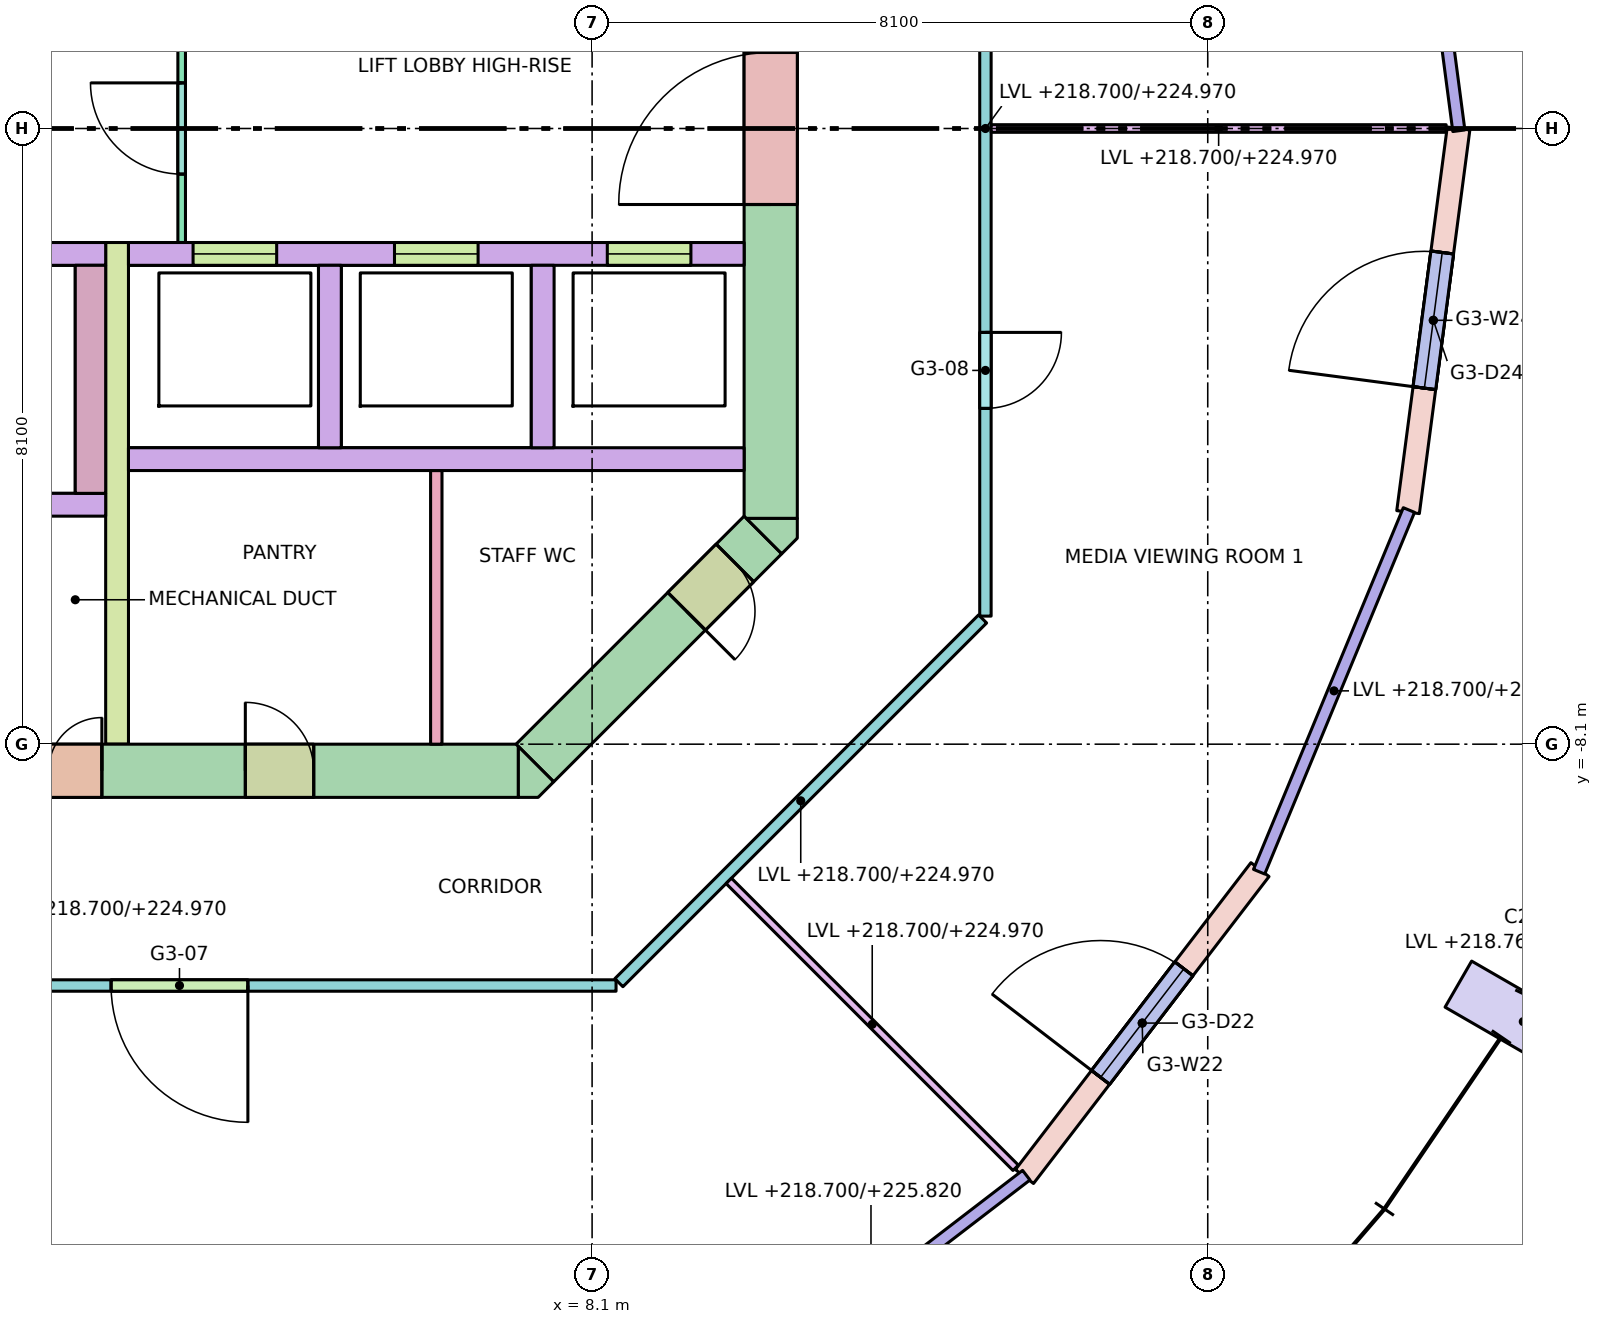
"""IFC4 building model, lengths in metres.
Left out: names, types, materials, properties, quantities, classifications, styles, units other than length and angle.
Written with IfcOpenShell. Run it as: python <this file> out.ifc"""

import sys

from ifc_helpers import new_model, si_unit, direction, frame, frame_2d, origin, origin_2d, place, context, subcontext, project, spatial, polyline, rectangle, outline, extrude, element, fill, save


model = new_model("IFC4")
c1 = context("Model", 3, precision=1e-05, world=origin(), true_north=direction((0.0, 1.0)))
c2 = subcontext(c1, "Body", "Model", "MODEL_VIEW")
j1 = project(units=[si_unit("LENGTHUNIT", "METRE"), si_unit("PLANEANGLEUNIT", "RADIAN")], contexts=[c1])
p1 = place(None, origin())
s1 = spatial("IfcSite", under=j1, at=p1, CompositionType="ELEMENT")
p2 = place(p1, origin())
s2 = spatial("IfcBuilding", under=s1, at=p2, CompositionType="ELEMENT")
p3 = place(p2, frame((0.0, 0.0, 218.7)))
s3 = spatial("IfcBuildingStorey", under=s2, at=p3, CompositionType="ELEMENT", Elevation=218.7)
p4 = place(p3, frame((19.927, -11.505, 0.067), z_axis=(0.115974555477, -0.066927607381, 0.990994751677), x_axis=(0.499830087764, 0.866123480438, 0.0)))
e1 = element("IfcColumn", 1, at=p4, inside=s3, PredefinedType="COLUMN", context=c2, shape_type="SweptSolid", body=[
    extrude(rectangle(XDim=0.7, YDim=1.0, at=origin_2d()), origin(), (0.0, 0.0, 1.0), 7.332),
])
p5 = place(p3, frame((-7.13, -8.45, -0.28), z_axis=(0.0, 0.0, 1.0), x_axis=(1.0, 0.0, 0.0)))
e2 = element("IfcWall", 2, at=p5, inside=s3, PredefinedType="SHEAR", context=c2, shape_type="SweptSolid", body=[
    extrude(rectangle(XDim=14.26, YDim=0.7, at=frame_2d((7.13, 0.0))), origin(), (0.0, 0.0, 1.0), 7.4),
])
p6 = place(p5, frame((8.08, 0.0, 0.28)))
e3 = element("IfcOpeningElement", 3, at=p6, cuts=e2, PredefinedType="OPENING", context=c2, shape_type="SweptSolid", body=[
    extrude(rectangle(XDim=0.7, YDim=2.1, at=frame_2d((0.35, 1.05))), frame((0.0, 0.36, 0.0), z_axis=(0.0, -1.0, 0.0), x_axis=(1.0, 0.0, 0.0)), (0.0, 0.0, 1.0), 0.72),
])
p7 = place(p5, frame((6.205, 0.0, 0.28)))
e4 = element("IfcOpeningElement", 4, at=p7, cuts=e2, PredefinedType="OPENING", context=c2, shape_type="SweptSolid", body=[
    extrude(rectangle(XDim=0.9, YDim=2.1, at=frame_2d((0.45, 1.05))), frame((0.0, 0.36, 0.0), z_axis=(0.0, -1.0, 0.0), x_axis=(1.0, 0.0, 0.0)), (0.0, 0.0, 1.0), 0.72),
])
p8 = place(p5, frame((10.667, 0.0, 0.28)))
e5 = element("IfcOpeningElement", 5, at=p8, cuts=e2, PredefinedType="OPENING", context=c2, shape_type="SweptSolid", body=[
    extrude(rectangle(XDim=0.9, YDim=2.1, at=frame_2d((0.45, 1.05))), frame((0.0, 0.36, 0.0), z_axis=(0.0, -1.0, 0.0), x_axis=(1.0, 0.0, 0.0)), (0.0, 0.0, 1.0), 0.72),
])
p9 = place(p3, frame((10.45, -5.13, -0.28), z_axis=(0.0, 0.0, 1.0), x_axis=(0.0, 1.0, 0.0)))
e6 = element("IfcWall", 6, at=p9, inside=s3, PredefinedType="SHEAR", context=c2, shape_type="SweptSolid", body=[
    extrude(rectangle(XDim=10.26, YDim=0.7, at=frame_2d((5.13, 0.0))), origin(), (0.0, 0.0, 1.0), 7.4),
])
p10 = place(p9, frame((4.13, 0.0, 0.28)))
e7 = element("IfcOpeningElement", 7, at=p10, cuts=e6, PredefinedType="OPENING", context=c2, shape_type="SweptSolid", body=[
    extrude(rectangle(XDim=2.0, YDim=2.1, at=frame_2d((1.0, 1.05))), frame((0.0, 0.36, 0.0), z_axis=(0.0, -1.0, 0.0), x_axis=(1.0, 0.0, 0.0)), (0.0, 0.0, 1.0), 0.72),
])
p11 = place(p3, frame((10.347, -5.347, -0.28), z_axis=(0.0, 0.0, 1.0), x_axis=(-0.707106781187, -0.707106781187, 0.0)))
e8 = element("IfcWall", 8, at=p11, inside=s3, PredefinedType="SHEAR", context=c2, shape_type="SweptSolid", body=[
    extrude(rectangle(XDim=4.243, YDim=0.7, at=frame_2d((2.121, 0.0))), origin(), (0.0, 0.0, 1.0), 7.4),
])
p12 = place(p11, frame((0.52, 0.0, 0.28)))
e9 = element("IfcOpeningElement", 9, at=p12, cuts=e8, PredefinedType="OPENING", context=c2, shape_type="SweptSolid", body=[
    extrude(rectangle(XDim=0.9, YDim=2.1, at=frame_2d((0.45, 1.05))), frame((0.0, 0.36, 0.0), z_axis=(0.0, -1.0, 0.0), x_axis=(1.0, 0.0, 0.0)), (0.0, 0.0, 1.0), 0.72),
])
p13 = place(p3, frame((0.0, 0.0, -0.28)))
e10 = element("IfcWall", 10, at=p13, inside=s3, PredefinedType="SHEAR", context=c2, shape_type="SweptSolid", body=[
    extrude(outline(polyline([(7.39, -8.8), (7.13, -8.8), (7.13, -8.8), (7.13, -8.13), (7.595, -8.595), (7.595, -8.595), (7.595, -8.595), (7.39, -8.8)])), origin(), (0.0, 0.0, 1.0), 7.4),
])
p14 = place(p3, frame((0.0, 0.0, -0.28)))
e11 = element("IfcWall", 11, at=p14, inside=s3, PredefinedType="SHEAR", context=c2, shape_type="SweptSolid", body=[
    extrude(outline(polyline([(10.8, -5.39), (10.595, -5.595), (10.595, -5.595), (10.595, -5.595), (10.13, -5.13), (10.8, -5.13), (10.8, -5.13), (10.8, -5.39)])), origin(), (0.0, 0.0, 1.0), 7.4),
])
p15 = place(p3, frame((2.0, -4.35, 0.0), z_axis=(0.0, 0.0, 1.0), x_axis=(1.0, 0.0, 0.0)))
e12 = element("IfcWall", 12, at=p15, inside=s3, PredefinedType="SOLIDWALL", context=c2, shape_type="SweptSolid", body=[
    extrude(rectangle(XDim=8.1, YDim=0.3, at=frame_2d((4.05, 0.0))), origin(), (0.0, 0.0, 1.0), 7.12),
])
p16 = place(p3, frame((2.0, -1.65, 0.0), z_axis=(0.0, 0.0, 1.0), x_axis=(1.0, 0.0, 0.0)))
e13 = element("IfcWall", 13, at=p16, inside=s3, PredefinedType="SOLIDWALL", context=c2, shape_type="SweptSolid", body=[
    extrude(rectangle(XDim=8.1, YDim=0.3, at=frame_2d((4.05, 0.0))), origin(), (0.0, 0.0, 1.0), 7.12),
])
p17 = place(p16, frame((0.85, 0.0, 0.0)))
e14 = element("IfcOpeningElement", 14, at=p17, cuts=e13, PredefinedType="OPENING", context=c2, shape_type="SweptSolid", body=[
    extrude(rectangle(XDim=1.1, YDim=2.1, at=frame_2d((0.55, 1.05))), frame((0.0, 0.16, 0.0), z_axis=(0.0, -1.0, 0.0), x_axis=(1.0, 0.0, 0.0)), (0.0, 0.0, 1.0), 0.32),
])
p18 = place(p16, frame((3.5, 0.0, 0.0)))
e15 = element("IfcOpeningElement", 15, at=p18, cuts=e13, PredefinedType="OPENING", context=c2, shape_type="SweptSolid", body=[
    extrude(rectangle(XDim=1.1, YDim=2.1, at=frame_2d((0.55, 1.05))), frame((0.0, 0.16, 0.0), z_axis=(0.0, -1.0, 0.0), x_axis=(1.0, 0.0, 0.0)), (0.0, 0.0, 1.0), 0.32),
])
p19 = place(p16, frame((6.3, 0.0, 0.0)))
e16 = element("IfcOpeningElement", 16, at=p19, cuts=e13, PredefinedType="OPENING", context=c2, shape_type="SweptSolid", body=[
    extrude(rectangle(XDim=1.1, YDim=2.1, at=frame_2d((0.55, 1.05))), frame((0.0, 0.16, 0.0), z_axis=(0.0, -1.0, 0.0), x_axis=(1.0, 0.0, 0.0)), (0.0, 0.0, 1.0), 0.32),
])
for number, where, z_axis, x_axis in (
    (17, (4.65, -4.2, 0.0), (0.0, 0.0, 1.0), (0.0, 1.0, 0.0)),
    (18, (7.45, -4.2, 0.0), (0.0, 0.0, 1.0), (0.0, 1.0, 0.0)),
):
    element("IfcWall", number, at=place(p3, frame(where, z_axis=z_axis, x_axis=x_axis)), inside=s3, PredefinedType="SOLIDWALL", context=c2, shape_type="SweptSolid", body=[
        extrude(rectangle(XDim=2.4, YDim=0.3, at=frame_2d((1.2, 0.0))), origin(), (0.0, 0.0, 1.0), 7.12),
    ])
p20 = place(p3, frame((1.85, -8.1, 0.0), z_axis=(0.0, 0.0, 1.0), x_axis=(0.0, 1.0, 0.0)))
e19 = element("IfcWall", 19, at=p20, inside=s3, PredefinedType="SHEAR", context=c2, shape_type="SweptSolid", body=[
    extrude(rectangle(XDim=6.6, YDim=0.3, at=frame_2d((3.3, 0.0))), origin(), (0.0, 0.0, 1.0), 7.12),
])
p21 = place(p3, frame((-1.7, -1.65, 0.0), z_axis=(0.0, 0.0, 1.0), x_axis=(1.0, 0.0, 0.0)))
e20 = element("IfcWall", 20, at=p21, inside=s3, PredefinedType="SOLIDWALL", context=c2, shape_type="SweptSolid", body=[
    extrude(rectangle(XDim=3.4, YDim=0.3, at=frame_2d((1.7, 0.0))), origin(), (0.0, 0.0, 1.0), 7.12),
])
p22 = place(p21, frame((1.15, 0.0, 0.0)))
e21 = element("IfcOpeningElement", 21, at=p22, cuts=e20, PredefinedType="OPENING", context=c2, shape_type="SweptSolid", body=[
    extrude(rectangle(XDim=1.1, YDim=2.1, at=frame_2d((0.55, 1.05))), frame((0.0, 0.16, 0.0), z_axis=(0.0, -1.0, 0.0), x_axis=(1.0, 0.0, 0.0)), (0.0, 0.0, 1.0), 0.32),
])
p23 = place(p3, frame((1.5, -4.8, 0.0), z_axis=(0.0, 0.0, 1.0), x_axis=(0.0, 1.0, 0.0)))
e22 = element("IfcWall", 22, at=p23, inside=s3, PredefinedType="SOLIDWALL", context=c2, shape_type="SweptSolid", body=[
    extrude(rectangle(XDim=3.0, YDim=0.4, at=frame_2d((1.5, 0.0))), origin(), (0.0, 0.0, 1.0), 7.12),
])
p24 = place(p3, frame((-1.7, -4.95, 0.0), z_axis=(0.0, 0.0, 1.0), x_axis=(1.0, 0.0, 0.0)))
e23 = element("IfcWall", 23, at=p24, inside=s3, PredefinedType="SOLIDWALL", context=c2, shape_type="SweptSolid", body=[
    extrude(rectangle(XDim=3.4, YDim=0.3, at=frame_2d((1.7, 0.0))), origin(), (0.0, 0.0, 1.0), 7.12),
])
p25 = place(p3, frame((13.789, -13.789, 0.0), z_axis=(0.0, 0.0, 1.0), x_axis=(0.608757714995, 0.79335619014, 0.0)))
e24 = element("IfcWall", 24, at=p25, inside=s3, PredefinedType="STANDARD", context=c2, shape_type="SweptSolid", body=[
    extrude(rectangle(XDim=5.091, YDim=0.3, at=frame_2d((2.545, 0.0))), origin(), (0.0, 0.0, 1.0), 7.12),
])
p26 = place(p25, frame((1.645, 0.0, 0.0)))
e25 = element("IfcOpeningElement", 25, at=p26, cuts=e24, PredefinedType="OPENING", context=c2, shape_type="SweptSolid", body=[
    extrude(rectangle(XDim=1.8, YDim=2.4, at=frame_2d((0.9, 1.2))), frame((0.0, 0.16, 0.0), z_axis=(0.0, -1.0, 0.0), x_axis=(1.0, 0.0, 0.0)), (0.0, 0.0, 1.0), 0.32),
])
p27 = place(p25, frame((1.645, 0.0, 2.8)))
e26 = element("IfcOpeningElement", 26, at=p27, cuts=e24, PredefinedType="OPENING", context=c2, shape_type="SweptSolid", body=[
    extrude(rectangle(XDim=1.8, YDim=4.1, at=frame_2d((0.9, 2.05))), frame((0.0, 0.16, 0.0), z_axis=(0.0, -1.0, 0.0), x_axis=(1.0, 0.0, 0.0)), (0.0, 0.0, 1.0), 0.32),
])
p28 = place(p3, frame((18.836, -5.047, 0.0), z_axis=(0.0, 0.0, 1.0), x_axis=(0.130495451964, 0.99144890792, 0.0)))
e27 = element("IfcWall", 27, at=p28, inside=s3, PredefinedType="STANDARD", context=c2, shape_type="SweptSolid", body=[
    extrude(rectangle(XDim=5.091, YDim=0.3, at=frame_2d((2.545, 0.0))), origin(), (0.0, 0.0, 1.0), 7.12),
])
p29 = place(p28, frame((1.645, 0.0, 0.0)))
e28 = element("IfcOpeningElement", 28, at=p29, cuts=e27, PredefinedType="OPENING", context=c2, shape_type="SweptSolid", body=[
    extrude(rectangle(XDim=1.8, YDim=2.4, at=frame_2d((0.9, 1.2))), frame((0.0, 0.16, 0.0), z_axis=(0.0, -1.0, 0.0), x_axis=(1.0, 0.0, 0.0)), (0.0, 0.0, 1.0), 0.32),
])
p30 = place(p28, frame((1.645, 0.0, 2.8)))
e29 = element("IfcOpeningElement", 29, at=p30, cuts=e27, PredefinedType="OPENING", context=c2, shape_type="SweptSolid", body=[
    extrude(rectangle(XDim=1.8, YDim=4.1, at=frame_2d((0.9, 2.05))), frame((0.0, 0.16, 0.0), z_axis=(0.0, -1.0, 0.0), x_axis=(1.0, 0.0, 0.0)), (0.0, 0.0, 1.0), 0.32),
])
p31 = place(p3, frame((2.7, -1.5, 0.0), z_axis=(0.0, 0.0, 1.0), x_axis=(0.0, 1.0, 0.0)))
e30 = element("IfcWall", 30, at=p31, inside=s3, PredefinedType="PARTITIONING", context=c2, shape_type="SweptSolid", body=[
    extrude(rectangle(XDim=3.0, YDim=0.1, at=frame_2d((1.5, 0.0))), origin(), (0.0, 0.0, 1.0), 7.12),
])
p32 = place(p31, frame((0.9, 0.0, 0.0)))
e31 = element("IfcOpeningElement", 31, at=p32, cuts=e30, PredefinedType="OPENING", context=c2, shape_type="SweptSolid", body=[
    extrude(rectangle(XDim=1.2, YDim=2.1, at=frame_2d((0.6, 1.05))), frame((0.0, 0.06, 0.0), z_axis=(0.0, -1.0, 0.0), x_axis=(1.0, 0.0, 0.0)), (0.0, 0.0, 1.0), 0.12),
])
p33 = place(p3, frame((6.05, -8.1, 0.0), z_axis=(0.0, 0.0, 1.0), x_axis=(0.0, 1.0, 0.0)))
e32 = element("IfcWall", 32, at=p33, inside=s3, PredefinedType="PARTITIONING", context=c2, shape_type="SweptSolid", body=[
    extrude(rectangle(XDim=3.6, YDim=0.15, at=frame_2d((1.8, 0.0))), origin(), (0.0, 0.0, 1.0), 7.12),
])
p34 = place(p3, frame((13.238, -6.452, 0.0), z_axis=(0.0, 0.0, 1.0), x_axis=(-0.707106781187, -0.707106781187, 0.0)))
e33 = element("IfcWall", 33, at=p34, inside=s3, PredefinedType="PARTITIONING", context=c2, shape_type="SweptSolid", body=[
    extrude(rectangle(XDim=6.768, YDim=0.15, at=frame_2d((3.384, 0.0))), origin(), (0.0, 0.0, 1.0), 6.27),
])
p35 = place(p3, frame((8.415, -11.275, 0.0), z_axis=(0.0, 0.0, 1.0), x_axis=(-1.0, 0.0, 0.0)))
e34 = element("IfcWall", 34, at=p35, inside=s3, PredefinedType="PARTITIONING", context=c2, shape_type="SweptSolid", body=[
    extrude(rectangle(XDim=16.83, YDim=0.15, at=frame_2d((8.415, 0.0))), origin(), (0.0, 0.0, 1.0), 6.27),
])
p36 = place(p35, frame((13.608, 0.0, 0.0)))
e35 = element("IfcOpeningElement", 35, at=p36, cuts=e34, PredefinedType="OPENING", context=c2, shape_type="SweptSolid", body=[
    extrude(rectangle(XDim=1.0, YDim=2.1, at=frame_2d((0.5, 1.05))), frame((0.0, 0.085, 0.0), z_axis=(0.0, -1.0, 0.0), x_axis=(1.0, 0.0, 0.0)), (0.0, 0.0, 1.0), 0.17),
])
p37 = place(p35, frame((4.844, 0.0, 0.0)))
e36 = element("IfcOpeningElement", 36, at=p37, cuts=e34, PredefinedType="OPENING", context=c2, shape_type="SweptSolid", body=[
    extrude(rectangle(XDim=1.8, YDim=2.1, at=frame_2d((0.9, 1.05))), frame((0.0, 0.085, 0.0), z_axis=(0.0, -1.0, 0.0), x_axis=(1.0, 0.0, 0.0)), (0.0, 0.0, 1.0), 0.17),
])
p38 = place(p3, frame((13.275, 6.415, 0.0), z_axis=(0.0, 0.0, 1.0), x_axis=(0.0, -1.0, 0.0)))
e37 = element("IfcWall", 37, at=p38, inside=s3, PredefinedType="PARTITIONING", context=c2, shape_type="SweptSolid", body=[
    extrude(rectangle(XDim=12.83, YDim=0.15, at=frame_2d((6.415, 0.0))), origin(), (0.0, 0.0, 1.0), 6.27),
])
p39 = place(p38, frame((9.098, 0.0, 0.0)))
e38 = element("IfcOpeningElement", 38, at=p39, cuts=e37, PredefinedType="OPENING", context=c2, shape_type="SweptSolid", body=[
    extrude(rectangle(XDim=1.0, YDim=2.1, at=frame_2d((0.5, 1.05))), frame((0.0, 0.085, 0.0), z_axis=(0.0, -1.0, 0.0), x_axis=(1.0, 0.0, 0.0)), (0.0, 0.0, 1.0), 0.17),
])
p40 = place(p38, frame((2.733, 0.0, 0.0)))
e39 = element("IfcOpeningElement", 39, at=p40, cuts=e37, PredefinedType="OPENING", context=c2, shape_type="SweptSolid", body=[
    extrude(rectangle(XDim=1.0, YDim=2.1, at=frame_2d((0.5, 1.05))), frame((0.0, 0.085, 0.0), z_axis=(0.0, -1.0, 0.0), x_axis=(1.0, 0.0, 0.0)), (0.0, 0.0, 1.0), 0.17),
])
p41 = place(p3, frame((13.35, 0.0, 0.0), z_axis=(0.0, 0.0, 1.0), x_axis=(1.0, 0.0, 0.0)))
e40 = element("IfcWall", 40, at=p41, inside=s3, PredefinedType="PARTITIONING", context=c2, shape_type="SweptSolid", body=[
    extrude(rectangle(XDim=5.987, YDim=0.1, at=frame_2d((2.993, 0.0))), origin(), (0.0, 0.0, 1.0), 6.27),
])
p42 = place(p3, frame((9.898, -9.898, 0.0), z_axis=(0.0, 0.0, 1.0), x_axis=(0.707106781187, -0.707106781187, 0.0)))
e41 = element("IfcWall", 41, at=p42, inside=s3, PredefinedType="PARTITIONING", context=c2, shape_type="SweptSolid", body=[
    extrude(rectangle(XDim=5.339, YDim=0.1, at=frame_2d((2.669, 0.0))), origin(), (0.0, 0.0, 1.0), 6.27),
])
p43 = place(p26, origin())
e42 = element("IfcDoor", 42, at=p43, inside=s3, OperationType="SINGLE_SWING_LEFT", PredefinedType="DOOR", context=c2, shape_type="SweptSolid", body=[
    extrude(rectangle(XDim=1.8, YDim=2.4, at=frame_2d((0.9, 1.2))), frame((0.0, 0.025, 0.0), z_axis=(0.0, -1.0, 0.0), x_axis=(1.0, 0.0, 0.0)), (0.0, 0.0, 1.0), 0.05),
])
fill(e25, e42)
p44 = place(p27, origin())
e43 = element("IfcWindow", 43, at=p44, inside=s3, PartitioningType="SINGLE_PANEL", PredefinedType="WINDOW", context=c2, shape_type="SweptSolid", body=[
    extrude(rectangle(XDim=1.8, YDim=4.1, at=frame_2d((0.9, 2.05))), frame((0.0, 0.03, 0.0), z_axis=(0.0, -1.0, 0.0), x_axis=(1.0, 0.0, 0.0)), (0.0, 0.0, 1.0), 0.06),
])
fill(e26, e43)
p45 = place(p29, origin())
e44 = element("IfcDoor", 44, at=p45, inside=s3, OperationType="SINGLE_SWING_LEFT", PredefinedType="DOOR", context=c2, shape_type="SweptSolid", body=[
    extrude(rectangle(XDim=1.8, YDim=2.4, at=frame_2d((0.9, 1.2))), frame((0.0, 0.025, 0.0), z_axis=(0.0, -1.0, 0.0), x_axis=(1.0, 0.0, 0.0)), (0.0, 0.0, 1.0), 0.05),
])
fill(e28, e44)
p46 = place(p30, origin())
e45 = element("IfcWindow", 45, at=p46, inside=s3, PartitioningType="SINGLE_PANEL", PredefinedType="WINDOW", context=c2, shape_type="SweptSolid", body=[
    extrude(rectangle(XDim=1.8, YDim=4.1, at=frame_2d((0.9, 2.05))), frame((0.0, 0.03, 0.0), z_axis=(0.0, -1.0, 0.0), x_axis=(1.0, 0.0, 0.0)), (0.0, 0.0, 1.0), 0.06),
])
fill(e29, e45)
p47 = place(p17, origin())
e46 = element("IfcDoor", 46, at=p47, inside=s3, OperationType="DOUBLE_DOOR_SLIDING", PredefinedType="DOOR", context=c2, shape_type="SweptSolid", body=[
    extrude(rectangle(XDim=1.1, YDim=2.1, at=frame_2d((0.55, 1.05))), frame((0.0, 0.025, 0.0), z_axis=(0.0, -1.0, 0.0), x_axis=(1.0, 0.0, 0.0)), (0.0, 0.0, 1.0), 0.05),
])
fill(e14, e46)
p48 = place(p18, origin())
e47 = element("IfcDoor", 47, at=p48, inside=s3, OperationType="DOUBLE_DOOR_SLIDING", PredefinedType="DOOR", context=c2, shape_type="SweptSolid", body=[
    extrude(rectangle(XDim=1.1, YDim=2.1, at=frame_2d((0.55, 1.05))), frame((0.0, 0.025, 0.0), z_axis=(0.0, -1.0, 0.0), x_axis=(1.0, 0.0, 0.0)), (0.0, 0.0, 1.0), 0.05),
])
fill(e15, e47)
p49 = place(p19, origin())
e48 = element("IfcDoor", 48, at=p49, inside=s3, OperationType="DOUBLE_DOOR_SLIDING", PredefinedType="DOOR", context=c2, shape_type="SweptSolid", body=[
    extrude(rectangle(XDim=1.1, YDim=2.1, at=frame_2d((0.55, 1.05))), frame((0.0, 0.025, 0.0), z_axis=(0.0, -1.0, 0.0), x_axis=(1.0, 0.0, 0.0)), (0.0, 0.0, 1.0), 0.05),
])
fill(e16, e48)
p50 = place(p10, origin())
e49 = element("IfcDoor", 49, at=p50, inside=s3, OperationType="DOUBLE_DOOR_SINGLE_SWING", PredefinedType="DOOR", context=c2, shape_type="SweptSolid", body=[
    extrude(rectangle(XDim=2.0, YDim=2.1, at=frame_2d((1.0, 1.05))), frame((0.0, 0.025, 0.0), z_axis=(0.0, -1.0, 0.0), x_axis=(1.0, 0.0, 0.0)), (0.0, 0.0, 1.0), 0.05),
])
fill(e7, e49)
p51 = place(p32, origin())
e50 = element("IfcDoor", 50, at=p51, inside=s3, OperationType="SINGLE_SWING_RIGHT", PredefinedType="DOOR", context=c2, shape_type="SweptSolid", body=[
    extrude(rectangle(XDim=1.2, YDim=2.1, at=frame_2d((0.6, 1.05))), frame((0.0, 0.025, 0.0), z_axis=(0.0, -1.0, 0.0), x_axis=(1.0, 0.0, 0.0)), (0.0, 0.0, 1.0), 0.05),
])
fill(e31, e50)
p52 = place(p6, origin())
e51 = element("IfcDoor", 51, at=p52, inside=s3, OperationType="SINGLE_SWING_RIGHT", PredefinedType="DOOR", context=c2, shape_type="SweptSolid", body=[
    extrude(rectangle(XDim=0.7, YDim=2.1, at=frame_2d((0.35, 1.05))), frame((0.0, 0.025, 0.0), z_axis=(0.0, -1.0, 0.0), x_axis=(1.0, 0.0, 0.0)), (0.0, 0.0, 1.0), 0.05),
])
fill(e3, e51)
p53 = place(p8, origin())
e52 = element("IfcDoor", 52, at=p53, inside=s3, OperationType="SINGLE_SWING_LEFT", PredefinedType="DOOR", context=c2, shape_type="SweptSolid", body=[
    extrude(rectangle(XDim=0.9, YDim=2.1, at=frame_2d((0.45, 1.05))), frame((0.0, 0.025, 0.0), z_axis=(0.0, -1.0, 0.0), x_axis=(1.0, 0.0, 0.0)), (0.0, 0.0, 1.0), 0.05),
])
fill(e5, e52)
p54 = place(p12, origin())
e53 = element("IfcDoor", 53, at=p54, inside=s3, OperationType="SINGLE_SWING_RIGHT", PredefinedType="DOOR", context=c2, shape_type="SweptSolid", body=[
    extrude(rectangle(XDim=0.9, YDim=2.1, at=frame_2d((0.45, 1.05))), frame((0.0, 0.025, 0.0), z_axis=(0.0, -1.0, 0.0), x_axis=(1.0, 0.0, 0.0)), (0.0, 0.0, 1.0), 0.05),
])
fill(e9, e53)
p55 = place(p37, origin())
e54 = element("IfcDoor", 54, at=p55, inside=s3, OperationType="DOUBLE_DOOR_SINGLE_SWING", PredefinedType="DOOR", context=c2, shape_type="SweptSolid", body=[
    extrude(rectangle(XDim=1.8, YDim=2.1, at=frame_2d((0.9, 1.05))), frame((0.0, 0.025, 0.0), z_axis=(0.0, -1.0, 0.0), x_axis=(1.0, 0.0, 0.0)), (0.0, 0.0, 1.0), 0.05),
])
fill(e36, e54)
p56 = place(p39, origin())
e55 = element("IfcDoor", 55, at=p56, inside=s3, OperationType="SINGLE_SWING_LEFT", PredefinedType="DOOR", context=c2, shape_type="SweptSolid", body=[
    extrude(rectangle(XDim=1.0, YDim=2.1, at=frame_2d((0.5, 1.05))), frame((0.0, 0.025, 0.0), z_axis=(0.0, -1.0, 0.0), x_axis=(1.0, 0.0, 0.0)), (0.0, 0.0, 1.0), 0.05),
])
fill(e38, e55)
save(model, sys.argv[1])
